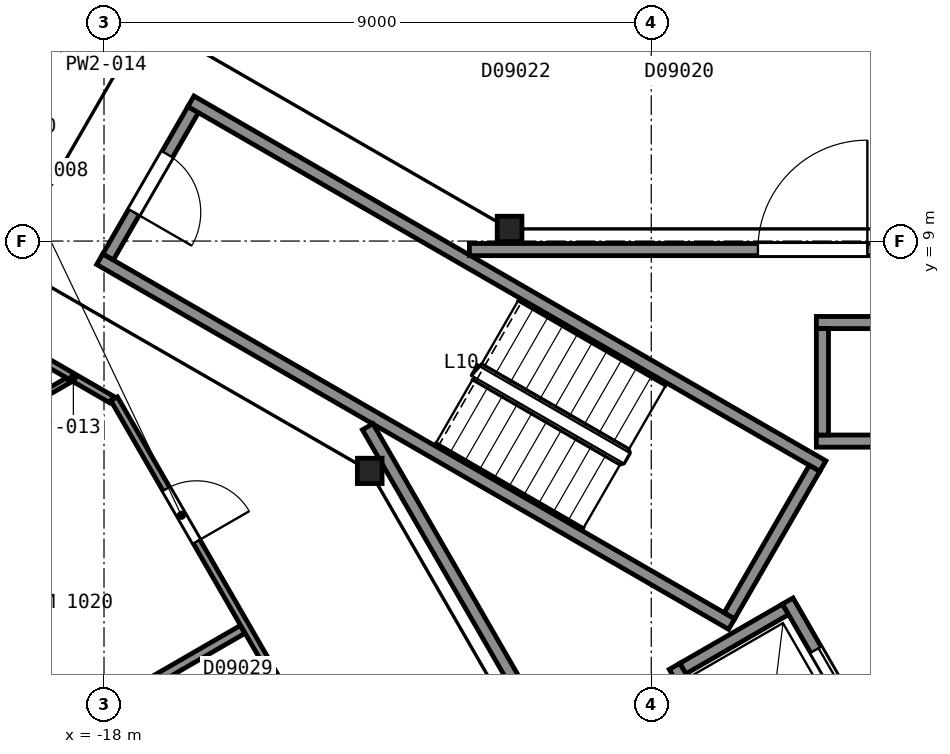
"""IFC4 building model, lengths in metres.
Left out: names, types, materials, properties, quantities, classifications, styles, units other than length and angle.
Written with IfcOpenShell. Run it as: python <this file> out.ifc"""

import sys

from ifc_helpers import new_model, si_unit, direction, frame, frame_2d, origin, origin_2d, place, context, subcontext, project, spatial, rectangle, i_section, extrude, element, fill, save


model = new_model("IFC4")
c1 = context("Model", 3, precision=1e-05, world=origin(), true_north=direction((0.0, 1.0)))
c2 = subcontext(c1, "Body", "Model", "MODEL_VIEW")
j1 = project(units=[si_unit("LENGTHUNIT", "METRE"), si_unit("PLANEANGLEUNIT", "RADIAN")], contexts=[c1])
p1 = place(None, origin())
s1 = spatial("IfcSite", under=j1, at=p1, CompositionType="ELEMENT")
p2 = place(p1, origin())
s2 = spatial("IfcBuilding", under=s1, at=p2, CompositionType="ELEMENT")
p3 = place(p2, frame((0.0, 0.0, 51.2)))
s3 = spatial("IfcBuildingStorey", under=s2, at=p3, CompositionType="ELEMENT", Elevation=51.2)
for number, where, z_axis, x_axis in (
    (1, (-11.33, 9.2, 0.0), (0.0, 0.0, 1.0), (1.0, 0.0, 0.0)),
    (2, (-13.63, 5.22, 0.0), (0.0, 0.0, 1.0), (1.0, 0.0, 0.0)),
):
    element("IfcColumn", number, at=place(p3, frame(where, z_axis=z_axis, x_axis=x_axis)), inside=s3, PredefinedType="COLUMN", context=c2, shape_type="SweptSolid", body=[
        extrude(i_section(OverallWidth=0.406, OverallDepth=0.417, WebThickness=0.03, FlangeThickness=0.048, FilletRadius=0.015, at=origin_2d()), origin(), (0.0, 0.0, 1.0), 3.6),
    ])
p4 = place(p3, frame((-16.534, 11.162, 0.0), z_axis=(0.0, 0.0, 1.0), x_axis=(-0.49998411664, -0.866034573852, 0.0)))
e3 = element("IfcWall", 3, at=p4, inside=s3, PredefinedType="PARTITIONING", context=c2, shape_type="SweptSolid", body=[
    extrude(rectangle(XDim=2.8, YDim=0.2, at=frame_2d((1.4, 0.0))), origin(), (0.0, 0.0, 1.0), 3.35),
])
p5 = place(p4, frame((0.85, 0.0, 0.0)))
e4 = element("IfcOpeningElement", 4, at=p5, cuts=e3, PredefinedType="OPENING", context=c2, shape_type="SweptSolid", body=[
    extrude(rectangle(XDim=1.1, YDim=2.1, at=frame_2d((0.55, 1.05))), frame((0.0, 0.11, 0.0), z_axis=(0.0, -1.0, 0.0), x_axis=(1.0, 0.0, 0.0)), (0.0, 0.0, 1.0), 0.22),
])
for number, where, z_axis, x_axis in (
    (5, (-7.678, 2.701, 0.0), (0.0, 0.0, 1.0), (-0.866, 0.5, 0.0)),
    (6, (-6.178, 5.299, 0.0), (0.0, 0.0, 1.0), (-0.866, 0.5, 0.0)),
):
    element("IfcWall", number, at=place(p3, frame(where, z_axis=z_axis, x_axis=x_axis)), inside=s3, PredefinedType="PARTITIONING", context=c2, shape_type="SweptSolid", body=[
        extrude(rectangle(XDim=12.0, YDim=0.2, at=frame_2d((6.0, 0.0))), origin(), (0.0, 0.0, 1.0), 3.35),
    ])
p6 = place(p3, frame((-6.315, 5.262, 0.0), z_axis=(0.0, 0.0, 1.0), x_axis=(-0.500049511043, -0.865996816683, 0.0)))
e7 = element("IfcWall", 7, at=p6, inside=s3, PredefinedType="PARTITIONING", context=c2, shape_type="SweptSolid", body=[
    extrude(rectangle(XDim=2.8, YDim=0.2, at=frame_2d((1.4, 0.0))), origin(), (0.0, 0.0, 1.0), 3.35),
])
for number, where, z_axis, x_axis in (
    (8, (-6.285, 5.71, 0.0), (0.0, 0.0, 1.0), (1.0, 0.0, 0.0)),
    (9, (-6.285, 7.66, 0.0), (0.0, 0.0, 1.0), (1.0, 0.0, 0.0)),
):
    element("IfcWall", number, at=place(p3, frame(where, z_axis=z_axis, x_axis=x_axis)), inside=s3, PredefinedType="PARTITIONING", context=c2, shape_type="SweptSolid", body=[
        extrude(rectangle(XDim=2.35, YDim=0.2, at=frame_2d((1.175, 0.0))), origin(), (0.0, 0.0, 1.0), 3.6),
    ])
p7 = place(p3, frame((-8.48, 1.969, 0.0), z_axis=(0.0, 0.0, 1.0), x_axis=(0.866000020948, 0.500043961785, 0.0)))
e10 = element("IfcWall", 10, at=p7, inside=s3, PredefinedType="PARTITIONING", context=c2, shape_type="SweptSolid", body=[
    extrude(rectangle(XDim=1.95, YDim=0.2, at=frame_2d((0.975, 0.0))), origin(), (0.0, 0.0, 1.0), 3.6),
])
p8 = place(p3, frame((-6.185, 5.81, 0.0), z_axis=(0.0, 0.0, 1.0), x_axis=(0.0, 1.0, 0.0)))
e11 = element("IfcWall", 11, at=p8, inside=s3, PredefinedType="PARTITIONING", context=c2, shape_type="SweptSolid", body=[
    extrude(rectangle(XDim=1.75, YDim=0.2, at=frame_2d((0.875, 0.0))), origin(), (0.0, 0.0, 1.0), 3.6),
])
p9 = place(p3, frame((-5.28, 0.525, 0.0), z_axis=(0.0, 0.0, 1.0), x_axis=(-0.500037662692, 0.866003658127, 0.0)))
e12 = element("IfcWall", 12, at=p9, inside=s3, PredefinedType="PARTITIONING", context=c2, shape_type="SweptSolid", body=[
    extrude(rectangle(XDim=2.95, YDim=0.2, at=frame_2d((1.475, 0.0))), origin(), (0.0, 0.0, 1.0), 3.6),
])
p10 = place(p9, frame((0.925, 0.0, 0.0)))
e13 = element("IfcOpeningElement", 13, at=p10, cuts=e12, PredefinedType="OPENING", context=c2, shape_type="SweptSolid", body=[
    extrude(rectangle(XDim=1.1, YDim=2.1, at=frame_2d((0.55, 1.05))), frame((0.0, 0.11, 0.0), z_axis=(0.0, -1.0, 0.0), x_axis=(1.0, 0.0, 0.0)), (0.0, 0.0, 1.0), 0.22),
])
p11 = place(p3, frame((-7.242, -0.376, 0.0), z_axis=(0.0, 0.0, 1.0), x_axis=(-0.499996545922, 0.866027397988, 0.0)))
e14 = element("IfcWall", 14, at=p11, inside=s3, PredefinedType="PARTITIONING", context=c2, shape_type="SweptSolid", body=[
    extrude(rectangle(XDim=2.75, YDim=0.2, at=frame_2d((1.375, 0.0))), origin(), (0.0, 0.0, 1.0), 3.6),
])
p12 = place(p3, frame((-13.664, 5.946, 0.0), z_axis=(0.0, 0.0, 1.0), x_axis=(0.499994327219, -0.866028678941, 0.0)))
e15 = element("IfcWall", 15, at=p12, inside=s3, PredefinedType="PARTITIONING", context=c2, shape_type="SweptSolid", body=[
    extrude(rectangle(XDim=23.968, YDim=0.2, at=frame_2d((11.984, 0.0))), origin(), (0.0, 0.0, 1.0), 3.35),
])
p13 = place(p3, frame((0.263, 8.86, 0.0), z_axis=(0.0, 0.0, 1.0), x_axis=(-1.0, 0.0, 0.0)))
e16 = element("IfcWall", 16, at=p13, inside=s3, PredefinedType="PARTITIONING", context=c2, shape_type="SweptSolid", body=[
    extrude(rectangle(XDim=12.254, YDim=0.2, at=frame_2d((6.127, 0.0))), origin(), (0.0, 0.0, 1.0), 3.35),
])
p14 = place(p13, frame((5.709, 0.0, 0.0)))
e17 = element("IfcOpeningElement", 17, at=p14, cuts=e16, PredefinedType="OPENING", context=c2, shape_type="SweptSolid", body=[
    extrude(rectangle(XDim=1.8, YDim=2.1, at=frame_2d((0.9, 1.05))), frame((0.0, 0.11, 0.0), z_axis=(0.0, -1.0, 0.0), x_axis=(1.0, 0.0, 0.0)), (0.0, 0.0, 1.0), 0.22),
])
p15 = place(p3, frame((-25.476, 2.735, 0.0), z_axis=(0.0, 0.0, 1.0), x_axis=(0.866077639848, 0.499909513568, 0.0)))
e18 = element("IfcWall", 18, at=p15, inside=s3, PredefinedType="PARTITIONING", context=c2, shape_type="SweptSolid", body=[
    extrude(rectangle(XDim=7.946, YDim=0.1, at=frame_2d((3.973, 0.0))), origin(), (0.0, 0.0, 1.0), 2.613),
])
p16 = place(p15, frame((3.604, 0.0, 0.0)))
e19 = element("IfcOpeningElement", 19, at=p16, cuts=e18, PredefinedType="OPENING", context=c2, shape_type="SweptSolid", body=[
    extrude(rectangle(XDim=0.9, YDim=2.1, at=frame_2d((0.45, 1.05))), frame((0.0, 0.06, 0.0), z_axis=(0.0, -1.0, 0.0), x_axis=(1.0, 0.0, 0.0)), (0.0, 0.0, 1.0), 0.12),
])
p17 = place(p3, frame((-22.984, -1.581, 0.0), z_axis=(0.0, 0.0, 1.0), x_axis=(0.866040157966, 0.499974444137, 0.0)))
e20 = element("IfcWall", 20, at=p17, inside=s3, PredefinedType="PARTITIONING", context=c2, shape_type="SweptSolid", body=[
    extrude(rectangle(XDim=8.387, YDim=0.15, at=frame_2d((4.193, 0.0))), origin(), (0.0, 0.0, 1.0), 2.613),
])
p18 = place(p3, frame((-19.132, 7.121, 0.0), z_axis=(0.0, 0.0, 1.0), x_axis=(0.865894215669, -0.500227155672, 0.0)))
e21 = element("IfcWall", 21, at=p18, inside=s3, PredefinedType="PARTITIONING", context=c2, shape_type="SweptSolid", body=[
    extrude(rectangle(XDim=1.451, YDim=0.125, at=frame_2d((0.726, 0.0))), origin(), (0.0, 0.0, 1.0), 2.613),
])
p19 = place(p3, frame((-3.766, -17.959, 0.0), z_axis=(0.0, 0.0, 1.0), x_axis=(-0.500002884005, 0.866023738697, 0.0)))
e22 = element("IfcWall", 22, at=p19, inside=s3, PredefinedType="PARTITIONING", context=c2, shape_type="SweptSolid", body=[
    extrude(rectangle(XDim=28.135, YDim=0.125, at=frame_2d((14.067, 0.0))), origin(), (0.0, 0.0, 1.0), 2.613),
])
p20 = place(p19, frame((25.422, 0.0, 0.0)))
e23 = element("IfcOpeningElement", 23, at=p20, cuts=e22, PredefinedType="OPENING", context=c2, shape_type="SweptSolid", body=[
    extrude(rectangle(XDim=1.0, YDim=2.1, at=frame_2d((0.5, 1.05))), frame((0.0, 0.073, 0.0), z_axis=(0.0, -1.0, 0.0), x_axis=(1.0, 0.0, 0.0)), (0.0, 0.0, 1.0), 0.145),
])
p21 = place(p19, frame((21.693, 0.0, 0.0)))
e24 = element("IfcOpeningElement", 24, at=p21, cuts=e22, PredefinedType="OPENING", context=c2, shape_type="SweptSolid", body=[
    extrude(rectangle(XDim=0.9, YDim=2.1, at=frame_2d((0.45, 1.05))), frame((0.0, 0.073, 0.0), z_axis=(0.0, -1.0, 0.0), x_axis=(1.0, 0.0, 0.0)), (0.0, 0.0, 1.0), 0.145),
])
p22 = place(p19, frame((14.438, 0.0, 0.0)))
e25 = element("IfcOpeningElement", 25, at=p22, cuts=e22, PredefinedType="OPENING", context=c2, shape_type="SweptSolid", body=[
    extrude(rectangle(XDim=0.9, YDim=2.1, at=frame_2d((0.45, 1.05))), frame((0.0, 0.073, 0.0), z_axis=(0.0, -1.0, 0.0), x_axis=(1.0, 0.0, 0.0)), (0.0, 0.0, 1.0), 0.145),
])
p23 = place(p19, frame((11.712, 0.0, 0.0)))
e26 = element("IfcOpeningElement", 26, at=p23, cuts=e22, PredefinedType="OPENING", context=c2, shape_type="SweptSolid", body=[
    extrude(rectangle(XDim=0.9, YDim=2.1, at=frame_2d((0.45, 1.05))), frame((0.0, 0.073, 0.0), z_axis=(0.0, -1.0, 0.0), x_axis=(1.0, 0.0, 0.0)), (0.0, 0.0, 1.0), 0.145),
])
p24 = place(p19, frame((4.787, 0.0, 0.0)))
e27 = element("IfcOpeningElement", 27, at=p24, cuts=e22, PredefinedType="OPENING", context=c2, shape_type="SweptSolid", body=[
    extrude(rectangle(XDim=0.9, YDim=2.1, at=frame_2d((0.45, 1.05))), frame((0.0, 0.073, 0.0), z_axis=(0.0, -1.0, 0.0), x_axis=(1.0, 0.0, 0.0)), (0.0, 0.0, 1.0), 0.145),
])
p25 = place(p19, frame((1.762, 0.0, 0.0)))
e28 = element("IfcOpeningElement", 28, at=p25, cuts=e22, PredefinedType="OPENING", context=c2, shape_type="SweptSolid", body=[
    extrude(rectangle(XDim=0.9, YDim=2.1, at=frame_2d((0.45, 1.05))), frame((0.0, 0.073, 0.0), z_axis=(0.0, -1.0, 0.0), x_axis=(1.0, 0.0, 0.0)), (0.0, 0.0, 1.0), 0.145),
])
p26 = place(p5, origin())
e29 = element("IfcDoor", 29, at=p26, inside=s3, OperationType="SINGLE_SWING_RIGHT", PredefinedType="DOOR", context=c2, shape_type="SweptSolid", body=[
    extrude(rectangle(XDim=1.1, YDim=2.1, at=frame_2d((0.55, 1.05))), frame((0.0, 0.025, 0.0), z_axis=(0.0, -1.0, 0.0), x_axis=(1.0, 0.0, 0.0)), (0.0, 0.0, 1.0), 0.05),
])
fill(e4, e29)
p27 = place(p10, origin())
e30 = element("IfcDoor", 30, at=p27, inside=s3, OperationType="SLIDING_TO_LEFT", PredefinedType="DOOR", context=c2, shape_type="SweptSolid", body=[
    extrude(rectangle(XDim=1.1, YDim=2.1, at=frame_2d((0.55, 1.05))), frame((0.0, 0.025, 0.0), z_axis=(0.0, -1.0, 0.0), x_axis=(1.0, 0.0, 0.0)), (0.0, 0.0, 1.0), 0.05),
])
fill(e13, e30)
p28 = place(p14, origin())
e31 = element("IfcDoor", 31, at=p28, inside=s3, OperationType="DOUBLE_DOOR_SINGLE_SWING", PredefinedType="DOOR", context=c2, shape_type="SweptSolid", body=[
    extrude(rectangle(XDim=1.8, YDim=2.1, at=frame_2d((0.9, 1.05))), frame((0.0, 0.025, 0.0), z_axis=(0.0, -1.0, 0.0), x_axis=(1.0, 0.0, 0.0)), (0.0, 0.0, 1.0), 0.05),
])
fill(e17, e31)
p29 = place(p20, origin())
e32 = element("IfcDoor", 32, at=p29, inside=s3, OperationType="SINGLE_SWING_LEFT", PredefinedType="DOOR", context=c2, shape_type="SweptSolid", body=[
    extrude(rectangle(XDim=1.0, YDim=2.1, at=frame_2d((0.5, 1.05))), frame((0.0, 0.025, 0.0), z_axis=(0.0, -1.0, 0.0), x_axis=(1.0, 0.0, 0.0)), (0.0, 0.0, 1.0), 0.05),
])
fill(e23, e32)
save(model, sys.argv[1])
